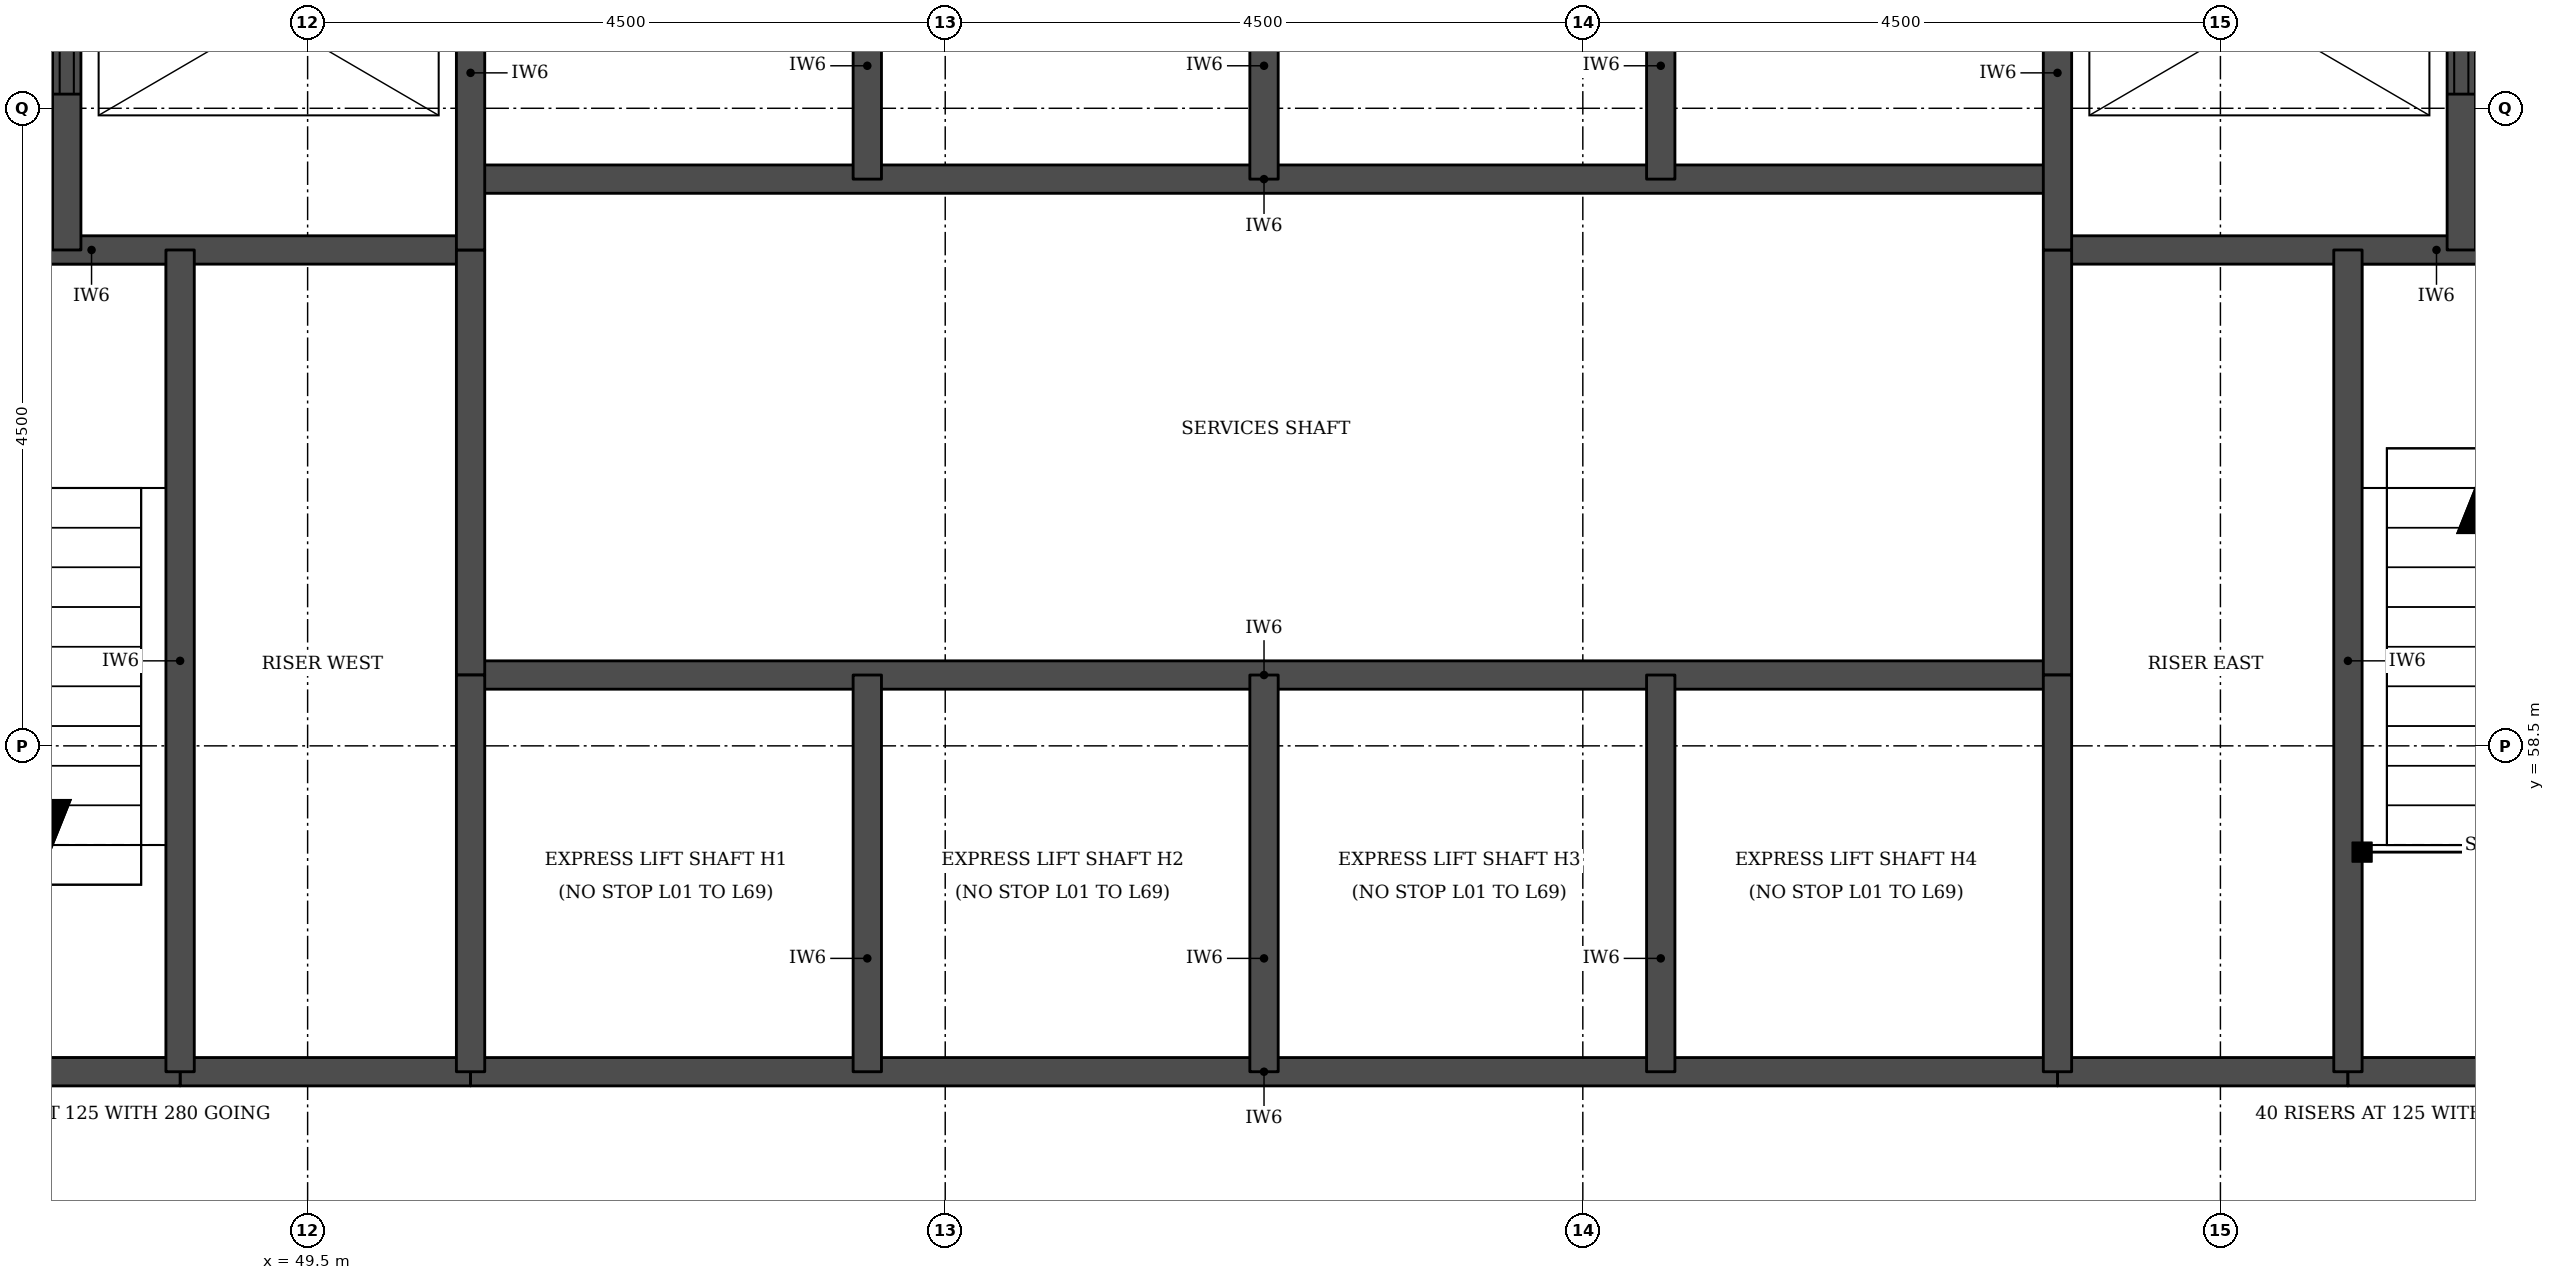
"""IFC4 building model, lengths in metres.
Left out: names, types, materials, properties, quantities, classifications, styles, units other than length and angle.
Written with IfcOpenShell. Run it as: python <this file> out.ifc"""

import sys

from ifc_helpers import new_model, si_unit, direction, frame, frame_2d, origin, place, context, subcontext, project, spatial, rectangle, extrude, element, fill, save


model = new_model("IFC4")
c1 = context("Model", 3, precision=1e-05, world=origin(), true_north=direction((0.0, 1.0)))
c2 = subcontext(c1, "Body", "Model", "MODEL_VIEW")
j1 = project(units=[si_unit("LENGTHUNIT", "METRE"), si_unit("PLANEANGLEUNIT", "RADIAN")], contexts=[c1])
p1 = place(None, origin())
s1 = spatial("IfcSite", under=j1, at=p1, CompositionType="ELEMENT")
p2 = place(p1, origin())
s2 = spatial("IfcBuilding", under=s1, at=p2, CompositionType="ELEMENT")
p3 = place(p2, frame((0.0, 0.0, 263.7)))
s3 = spatial("IfcBuildingStorey", under=s2, at=p3, CompositionType="ELEMENT", Elevation=263.7)
for number, where, z_axis, x_axis in (
    (1, (48.6, 56.2, 0.0), (0.0, 0.0, 1.0), (1.0, 0.0, 0.0)),
    (2, (61.85, 56.2, 0.0), (0.0, 0.0, 1.0), (1.0, 0.0, 0.0)),
):
    element("IfcWall", number, at=place(p3, frame(where, z_axis=z_axis, x_axis=x_axis)), inside=s3, PredefinedType="SOLIDWALL", context=c2, shape_type="SweptSolid", body=[
        extrude(rectangle(XDim=2.05, YDim=0.2, at=frame_2d((1.025, 0.0))), origin(), (0.0, 0.0, 1.0), 4.75),
    ])
p4 = place(p3, frame((45.3, 56.2, 0.0), z_axis=(0.0, 0.0, 1.0), x_axis=(1.0, 0.0, 0.0)))
e3 = element("IfcWall", 3, at=p4, inside=s3, PredefinedType="SOLIDWALL", context=c2, shape_type="SweptSolid", body=[
    extrude(rectangle(XDim=3.3, YDim=0.2, at=frame_2d((1.65, 0.0))), origin(), (0.0, 0.0, 1.0), 4.75),
])
p5 = place(p3, frame((50.65, 56.2, 0.0), z_axis=(0.0, 0.0, 1.0), x_axis=(1.0, 0.0, 0.0)))
e4 = element("IfcWall", 4, at=p5, inside=s3, PredefinedType="SOLIDWALL", context=c2, shape_type="SweptSolid", body=[
    extrude(rectangle(XDim=11.2, YDim=0.2, at=frame_2d((5.6, 0.0))), origin(), (0.0, 0.0, 1.0), 4.75),
])
p6 = place(p3, frame((63.9, 56.2, 0.0), z_axis=(0.0, 0.0, 1.0), x_axis=(1.0, 0.0, 0.0)))
e5 = element("IfcWall", 5, at=p6, inside=s3, PredefinedType="SOLIDWALL", context=c2, shape_type="SweptSolid", body=[
    extrude(rectangle(XDim=3.3, YDim=0.2, at=frame_2d((1.65, 0.0))), origin(), (0.0, 0.0, 1.0), 4.75),
])
p7 = place(p3, frame((50.65, 59.0, 0.0), z_axis=(0.0, 0.0, 1.0), x_axis=(1.0, 0.0, 0.0)))
e6 = element("IfcWall", 6, at=p7, inside=s3, PredefinedType="SOLIDWALL", context=c2, shape_type="SweptSolid", body=[
    extrude(rectangle(XDim=11.2, YDim=0.2, at=frame_2d((5.6, 0.0))), origin(), (0.0, 0.0, 1.0), 4.75),
])
for number, where, z_axis, x_axis in (
    (7, (45.3, 62.0, 0.0), (0.0, 0.0, 1.0), (1.0, 0.0, 0.0)),
    (8, (61.85, 62.0, 0.0), (0.0, 0.0, 1.0), (1.0, 0.0, 0.0)),
):
    element("IfcWall", number, at=place(p3, frame(where, z_axis=z_axis, x_axis=x_axis)), inside=s3, PredefinedType="SOLIDWALL", context=c2, shape_type="SweptSolid", body=[
        extrude(rectangle(XDim=5.35, YDim=0.2, at=frame_2d((2.675, 0.0))), origin(), (0.0, 0.0, 1.0), 4.75),
    ])
p8 = place(p3, frame((50.65, 62.5, 0.0), z_axis=(0.0, 0.0, 1.0), x_axis=(1.0, 0.0, 0.0)))
e9 = element("IfcWall", 9, at=p8, inside=s3, PredefinedType="SOLIDWALL", context=c2, shape_type="SweptSolid", body=[
    extrude(rectangle(XDim=11.2, YDim=0.2, at=frame_2d((5.6, 0.0))), origin(), (0.0, 0.0, 1.0), 4.75),
])
p9 = place(p3, frame((47.8, 62.0, 0.0), z_axis=(0.0, 0.0, 1.0), x_axis=(0.0, 1.0, 0.0)))
e10 = element("IfcWall", 10, at=p9, inside=s3, PredefinedType="SOLIDWALL", context=c2, shape_type="SweptSolid", body=[
    extrude(rectangle(XDim=3.3, YDim=0.2, at=frame_2d((1.65, 0.0))), origin(), (0.0, 0.0, 1.0), 4.75),
])
p10 = place(p9, frame((1.1, 0.0, 0.0)))
e11 = element("IfcOpeningElement", 11, at=p10, cuts=e10, PredefinedType="OPENING", context=c2, shape_type="SweptSolid", body=[
    extrude(rectangle(XDim=1.1, YDim=2.1, at=frame_2d((0.55, 1.05))), frame((0.0, 0.11, 0.0), z_axis=(0.0, -1.0, 0.0), x_axis=(1.0, 0.0, 0.0)), (0.0, 0.0, 1.0), 0.22),
])
p11 = place(p3, frame((48.6, 56.2, 0.0), z_axis=(0.0, 0.0, 1.0), x_axis=(0.0, 1.0, 0.0)))
e12 = element("IfcWall", 12, at=p11, inside=s3, PredefinedType="SOLIDWALL", context=c2, shape_type="SweptSolid", body=[
    extrude(rectangle(XDim=5.8, YDim=0.2, at=frame_2d((2.9, 0.0))), origin(), (0.0, 0.0, 1.0), 4.75),
])
p12 = place(p3, frame((50.65, 59.0, 0.0), z_axis=(0.0, 0.0, 1.0), x_axis=(0.0, 1.0, 0.0)))
e13 = element("IfcWall", 13, at=p12, inside=s3, PredefinedType="SOLIDWALL", context=c2, shape_type="SweptSolid", body=[
    extrude(rectangle(XDim=3.0, YDim=0.2, at=frame_2d((1.5, 0.0))), origin(), (0.0, 0.0, 1.0), 4.75),
])
p13 = place(p3, frame((50.65, 56.2, 0.0), z_axis=(0.0, 0.0, 1.0), x_axis=(0.0, 1.0, 0.0)))
e14 = element("IfcWall", 14, at=p13, inside=s3, PredefinedType="SOLIDWALL", context=c2, shape_type="SweptSolid", body=[
    extrude(rectangle(XDim=2.8, YDim=0.2, at=frame_2d((1.4, 0.0))), origin(), (0.0, 0.0, 1.0), 4.75),
])
p14 = place(p3, frame((50.65, 62.0, 0.0), z_axis=(0.0, 0.0, 1.0), x_axis=(0.0, 1.0, 0.0)))
e15 = element("IfcWall", 15, at=p14, inside=s3, PredefinedType="SOLIDWALL", context=c2, shape_type="SweptSolid", body=[
    extrude(rectangle(XDim=3.3, YDim=0.2, at=frame_2d((1.65, 0.0))), origin(), (0.0, 0.0, 1.0), 4.75),
])
for number, where, z_axis, x_axis in (
    (16, (53.45, 56.2, 0.0), (0.0, 0.0, 1.0), (0.0, 1.0, 0.0)),
    (17, (53.45, 62.5, 0.0), (0.0, 0.0, 1.0), (0.0, 1.0, 0.0)),
    (18, (56.25, 56.2, 0.0), (0.0, 0.0, 1.0), (0.0, 1.0, 0.0)),
    (19, (56.25, 62.5, 0.0), (0.0, 0.0, 1.0), (0.0, 1.0, 0.0)),
    (20, (59.05, 56.2, 0.0), (0.0, 0.0, 1.0), (0.0, 1.0, 0.0)),
    (21, (59.05, 62.5, 0.0), (0.0, 0.0, 1.0), (0.0, 1.0, 0.0)),
):
    element("IfcWall", number, at=place(p3, frame(where, z_axis=z_axis, x_axis=x_axis)), inside=s3, PredefinedType="SOLIDWALL", context=c2, shape_type="SweptSolid", body=[
        extrude(rectangle(XDim=2.8, YDim=0.2, at=frame_2d((1.4, 0.0))), origin(), (0.0, 0.0, 1.0), 4.75),
    ])
p15 = place(p3, frame((61.85, 59.0, 0.0), z_axis=(0.0, 0.0, 1.0), x_axis=(0.0, 1.0, 0.0)))
e22 = element("IfcWall", 22, at=p15, inside=s3, PredefinedType="SOLIDWALL", context=c2, shape_type="SweptSolid", body=[
    extrude(rectangle(XDim=3.0, YDim=0.2, at=frame_2d((1.5, 0.0))), origin(), (0.0, 0.0, 1.0), 4.75),
])
p16 = place(p3, frame((61.85, 56.2, 0.0), z_axis=(0.0, 0.0, 1.0), x_axis=(0.0, 1.0, 0.0)))
e23 = element("IfcWall", 23, at=p16, inside=s3, PredefinedType="SOLIDWALL", context=c2, shape_type="SweptSolid", body=[
    extrude(rectangle(XDim=2.8, YDim=0.2, at=frame_2d((1.4, 0.0))), origin(), (0.0, 0.0, 1.0), 4.75),
])
p17 = place(p3, frame((61.85, 62.0, 0.0), z_axis=(0.0, 0.0, 1.0), x_axis=(0.0, 1.0, 0.0)))
e24 = element("IfcWall", 24, at=p17, inside=s3, PredefinedType="SOLIDWALL", context=c2, shape_type="SweptSolid", body=[
    extrude(rectangle(XDim=3.3, YDim=0.2, at=frame_2d((1.65, 0.0))), origin(), (0.0, 0.0, 1.0), 4.75),
])
p18 = place(p3, frame((63.9, 56.2, 0.0), z_axis=(0.0, 0.0, 1.0), x_axis=(0.0, 1.0, 0.0)))
e25 = element("IfcWall", 25, at=p18, inside=s3, PredefinedType="SOLIDWALL", context=c2, shape_type="SweptSolid", body=[
    extrude(rectangle(XDim=5.8, YDim=0.2, at=frame_2d((2.9, 0.0))), origin(), (0.0, 0.0, 1.0), 4.75),
])
p19 = place(p3, frame((64.7, 62.0, 0.0), z_axis=(0.0, 0.0, 1.0), x_axis=(0.0, 1.0, 0.0)))
e26 = element("IfcWall", 26, at=p19, inside=s3, PredefinedType="SOLIDWALL", context=c2, shape_type="SweptSolid", body=[
    extrude(rectangle(XDim=3.3, YDim=0.2, at=frame_2d((1.65, 0.0))), origin(), (0.0, 0.0, 1.0), 4.75),
])
p20 = place(p19, frame((1.1, 0.0, 0.0)))
e27 = element("IfcOpeningElement", 27, at=p20, cuts=e26, PredefinedType="OPENING", context=c2, shape_type="SweptSolid", body=[
    extrude(rectangle(XDim=1.1, YDim=2.1, at=frame_2d((0.55, 1.05))), frame((0.0, 0.11, 0.0), z_axis=(0.0, -1.0, 0.0), x_axis=(1.0, 0.0, 0.0)), (0.0, 0.0, 1.0), 0.22),
])
p21 = place(p10, origin())
e28 = element("IfcDoor", 28, at=p21, inside=s3, OperationType="DOUBLE_DOOR_SLIDING", PredefinedType="DOOR", context=c2, shape_type="SweptSolid", body=[
    extrude(rectangle(XDim=1.1, YDim=2.1, at=frame_2d((0.55, 1.05))), frame((0.0, 0.025, 0.0), z_axis=(0.0, -1.0, 0.0), x_axis=(1.0, 0.0, 0.0)), (0.0, 0.0, 1.0), 0.05),
])
fill(e11, e28)
p22 = place(p20, origin())
e29 = element("IfcDoor", 29, at=p22, inside=s3, OperationType="DOUBLE_DOOR_SLIDING", PredefinedType="DOOR", context=c2, shape_type="SweptSolid", body=[
    extrude(rectangle(XDim=1.1, YDim=2.1, at=frame_2d((0.55, 1.05))), frame((0.0, 0.025, 0.0), z_axis=(0.0, -1.0, 0.0), x_axis=(1.0, 0.0, 0.0)), (0.0, 0.0, 1.0), 0.05),
])
fill(e27, e29)
save(model, sys.argv[1])
